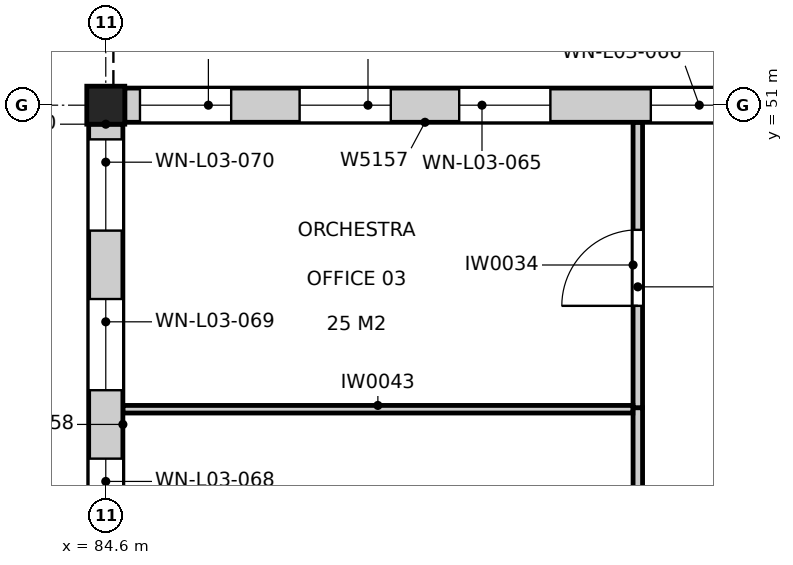
"""IFC4 building model, lengths in metres.
Left out: names, types, materials, properties, quantities, classifications, styles, units other than length and angle.
Written with IfcOpenShell. Run it as: python <this file> out.ifc"""

import sys

from ifc_helpers import new_model, si_unit, direction, frame, frame_2d, origin, origin_2d, place, context, subcontext, project, spatial, rectangle, extrude, element, fill, save


model = new_model("IFC4")
c1 = context("Model", 3, precision=1e-05, world=origin(), true_north=direction((0.0, 1.0)))
c2 = subcontext(c1, "Body", "Model", "MODEL_VIEW")
j1 = project(units=[si_unit("LENGTHUNIT", "METRE"), si_unit("PLANEANGLEUNIT", "RADIAN")], contexts=[c1])
p1 = place(None, origin())
s1 = spatial("IfcSite", under=j1, at=p1, CompositionType="ELEMENT")
p2 = place(p1, origin())
s2 = spatial("IfcBuilding", under=s1, at=p2, CompositionType="ELEMENT")
p3 = place(p2, frame((0.0, 0.0, 14.4)))
s3 = spatial("IfcBuildingStorey", under=s2, at=p3, CompositionType="ELEMENT", Elevation=14.4)
p4 = place(p3, frame((84.6, 51.0, 0.0), z_axis=(0.0, 0.0, 1.0), x_axis=(1.0, 0.0, 0.0)))
e1 = element("IfcColumn", 1, at=p4, inside=s3, PredefinedType="COLUMN", context=c2, shape_type="SweptSolid", body=[
    extrude(rectangle(XDim=0.5, YDim=0.5, at=origin_2d()), origin(), (0.0, 0.0, 1.0), 4.8),
])
p5 = place(p3, frame((91.601, 42.711, 0.0), z_axis=(0.0, 0.0, 1.0), x_axis=(-0.000226654573, 0.999999974314, 0.0)))
e2 = element("IfcWall", 2, at=p5, inside=s3, PredefinedType="PARTITIONING", context=c2, shape_type="SweptSolid", body=[
    extrude(rectangle(XDim=4.309, YDim=0.125, at=frame_2d((2.154, 0.0))), origin(), (0.0, 0.0, 1.0), 3.84),
])
p6 = place(p3, frame((91.6, 47.02, 0.0), z_axis=(0.0, 0.0, 1.0), x_axis=(0.0, 1.0, 0.0)))
e3 = element("IfcWall", 3, at=p6, inside=s3, PredefinedType="PARTITIONING", context=c2, shape_type="SweptSolid", body=[
    extrude(rectangle(XDim=3.755, YDim=0.125, at=frame_2d((1.877, 0.0))), origin(), (0.0, 0.0, 1.0), 3.94),
])
p7 = place(p6, frame((1.34, 0.0, 0.0)))
e4 = element("IfcOpeningElement", 4, at=p7, cuts=e3, PredefinedType="OPENING", context=c2, shape_type="SweptSolid", body=[
    extrude(rectangle(XDim=1.0, YDim=2.1, at=frame_2d((0.5, 1.05))), frame((0.0, 0.073, 0.0), z_axis=(0.0, -1.0, 0.0), x_axis=(1.0, 0.0, 0.0)), (0.0, 0.0, 1.0), 0.145),
])
p8 = place(p3, frame((84.825, 47.0, 0.0), z_axis=(0.0, 0.0, 1.0), x_axis=(1.0, 0.0, 0.0)))
e5 = element("IfcWall", 5, at=p8, inside=s3, PredefinedType="PARTITIONING", context=c2, shape_type="SweptSolid", body=[
    extrude(rectangle(XDim=6.71, YDim=0.1, at=frame_2d((3.355, 0.0))), origin(), (0.0, 0.0, 1.0), 4.64),
])
p9 = place(p3, frame((92.75, 51.0, 0.0), z_axis=(0.0, 0.0, 1.0), x_axis=(-1.0, 0.0, 0.0)))
e6 = element("IfcWall", 6, at=p9, inside=s3, PredefinedType="SOLIDWALL", context=c2, shape_type="SweptSolid", body=[
    extrude(rectangle(XDim=7.9, YDim=0.45, at=frame_2d((3.95, 0.0))), origin(), (0.0, 0.0, 1.0), 3.84),
])
p10 = place(p9, frame((6.5, 0.0, 0.9)))
e7 = element("IfcOpeningElement", 7, at=p10, cuts=e6, PredefinedType="OPENING", context=c2, shape_type="SweptSolid", body=[
    extrude(rectangle(XDim=1.2, YDim=2.4, at=frame_2d((0.6, 1.2))), frame((0.0, 0.235, 0.0), z_axis=(0.0, -1.0, 0.0), x_axis=(1.0, 0.0, 0.0)), (0.0, 0.0, 1.0), 0.47),
])
p11 = place(p9, frame((4.4, 0.0, 0.9)))
e8 = element("IfcOpeningElement", 8, at=p11, cuts=e6, PredefinedType="OPENING", context=c2, shape_type="SweptSolid", body=[
    extrude(rectangle(XDim=1.2, YDim=2.4, at=frame_2d((0.6, 1.2))), frame((0.0, 0.235, 0.0), z_axis=(0.0, -1.0, 0.0), x_axis=(1.0, 0.0, 0.0)), (0.0, 0.0, 1.0), 0.47),
])
p12 = place(p9, frame((2.3, 0.0, 0.9)))
e9 = element("IfcOpeningElement", 9, at=p12, cuts=e6, PredefinedType="OPENING", context=c2, shape_type="SweptSolid", body=[
    extrude(rectangle(XDim=1.2, YDim=2.4, at=frame_2d((0.6, 1.2))), frame((0.0, 0.235, 0.0), z_axis=(0.0, -1.0, 0.0), x_axis=(1.0, 0.0, 0.0)), (0.0, 0.0, 1.0), 0.47),
])
p13 = place(p9, frame((0.129, 0.0, 0.9)))
e10 = element("IfcOpeningElement", 10, at=p13, cuts=e6, PredefinedType="OPENING", context=c2, shape_type="SweptSolid", body=[
    extrude(rectangle(XDim=0.85, YDim=2.4, at=frame_2d((0.425, 1.2))), frame((0.0, 0.235, 0.0), z_axis=(0.0, -1.0, 0.0), x_axis=(1.0, 0.0, 0.0)), (0.0, 0.0, 1.0), 0.47),
])
p14 = place(p3, frame((84.6, 50.75, 0.0), z_axis=(0.0, 0.0, 1.0), x_axis=(0.0, -1.0, 0.0)))
e11 = element("IfcWall", 11, at=p14, inside=s3, PredefinedType="SOLIDWALL", context=c2, shape_type="SweptSolid", body=[
    extrude(rectangle(XDim=7.9, YDim=0.45, at=frame_2d((3.95, 0.0))), origin(), (0.0, 0.0, 1.0), 3.84),
])
p15 = place(p14, frame((6.5, 0.0, 0.9)))
e12 = element("IfcOpeningElement", 12, at=p15, cuts=e11, PredefinedType="OPENING", context=c2, shape_type="SweptSolid", body=[
    extrude(rectangle(XDim=1.2, YDim=2.4, at=frame_2d((0.6, 1.2))), frame((0.0, 0.235, 0.0), z_axis=(0.0, -1.0, 0.0), x_axis=(1.0, 0.0, 0.0)), (0.0, 0.0, 1.0), 0.47),
])
p16 = place(p14, frame((4.4, 0.0, 0.9)))
e13 = element("IfcOpeningElement", 13, at=p16, cuts=e11, PredefinedType="OPENING", context=c2, shape_type="SweptSolid", body=[
    extrude(rectangle(XDim=1.2, YDim=2.4, at=frame_2d((0.6, 1.2))), frame((0.0, 0.235, 0.0), z_axis=(0.0, -1.0, 0.0), x_axis=(1.0, 0.0, 0.0)), (0.0, 0.0, 1.0), 0.47),
])
p17 = place(p14, frame((2.3, 0.0, 0.9)))
e14 = element("IfcOpeningElement", 14, at=p17, cuts=e11, PredefinedType="OPENING", context=c2, shape_type="SweptSolid", body=[
    extrude(rectangle(XDim=1.2, YDim=2.4, at=frame_2d((0.6, 1.2))), frame((0.0, 0.235, 0.0), z_axis=(0.0, -1.0, 0.0), x_axis=(1.0, 0.0, 0.0)), (0.0, 0.0, 1.0), 0.47),
])
p18 = place(p14, frame((0.2, 0.0, 0.9)))
e15 = element("IfcOpeningElement", 15, at=p18, cuts=e11, PredefinedType="OPENING", context=c2, shape_type="SweptSolid", body=[
    extrude(rectangle(XDim=1.2, YDim=2.4, at=frame_2d((0.6, 1.2))), frame((0.0, 0.235, 0.0), z_axis=(0.0, -1.0, 0.0), x_axis=(1.0, 0.0, 0.0)), (0.0, 0.0, 1.0), 0.47),
])
p19 = place(p7, origin())
e16 = element("IfcDoor", 16, at=p19, inside=s3, OperationType="SINGLE_SWING_LEFT", PredefinedType="DOOR", context=c2, shape_type="SweptSolid", body=[
    extrude(rectangle(XDim=1.0, YDim=2.1, at=frame_2d((0.5, 1.05))), frame((0.0, 0.025, 0.0), z_axis=(0.0, -1.0, 0.0), x_axis=(1.0, 0.0, 0.0)), (0.0, 0.0, 1.0), 0.05),
])
fill(e4, e16)
p20 = place(p10, origin())
e17 = element("IfcWindow", 17, at=p20, inside=s3, PartitioningType="SINGLE_PANEL", PredefinedType="WINDOW", context=c2, shape_type="SweptSolid", body=[
    extrude(rectangle(XDim=1.2, YDim=2.4, at=frame_2d((0.6, 1.2))), frame((0.0, 0.135, 0.0), z_axis=(0.0, -1.0, 0.0), x_axis=(1.0, 0.0, 0.0)), (0.0, 0.0, 1.0), 0.06),
])
fill(e7, e17)
p21 = place(p11, origin())
e18 = element("IfcWindow", 18, at=p21, inside=s3, PartitioningType="SINGLE_PANEL", PredefinedType="WINDOW", context=c2, shape_type="SweptSolid", body=[
    extrude(rectangle(XDim=1.2, YDim=2.4, at=frame_2d((0.6, 1.2))), frame((0.0, 0.135, 0.0), z_axis=(0.0, -1.0, 0.0), x_axis=(1.0, 0.0, 0.0)), (0.0, 0.0, 1.0), 0.06),
])
fill(e8, e18)
p22 = place(p12, origin())
e19 = element("IfcWindow", 19, at=p22, inside=s3, PartitioningType="SINGLE_PANEL", PredefinedType="WINDOW", context=c2, shape_type="SweptSolid", body=[
    extrude(rectangle(XDim=1.2, YDim=2.4, at=frame_2d((0.6, 1.2))), frame((0.0, 0.135, 0.0), z_axis=(0.0, -1.0, 0.0), x_axis=(1.0, 0.0, 0.0)), (0.0, 0.0, 1.0), 0.06),
])
fill(e9, e19)
p23 = place(p13, origin())
e20 = element("IfcWindow", 20, at=p23, inside=s3, PartitioningType="SINGLE_PANEL", PredefinedType="WINDOW", context=c2, shape_type="SweptSolid", body=[
    extrude(rectangle(XDim=0.85, YDim=2.4, at=frame_2d((0.425, 1.2))), frame((0.0, 0.135, 0.0), z_axis=(0.0, -1.0, 0.0), x_axis=(1.0, 0.0, 0.0)), (0.0, 0.0, 1.0), 0.06),
])
fill(e10, e20)
p24 = place(p16, origin())
e21 = element("IfcWindow", 21, at=p24, inside=s3, PartitioningType="SINGLE_PANEL", PredefinedType="WINDOW", context=c2, shape_type="SweptSolid", body=[
    extrude(rectangle(XDim=1.2, YDim=2.4, at=frame_2d((0.6, 1.2))), frame((0.0, 0.135, 0.0), z_axis=(0.0, -1.0, 0.0), x_axis=(1.0, 0.0, 0.0)), (0.0, 0.0, 1.0), 0.06),
])
fill(e13, e21)
p25 = place(p17, origin())
e22 = element("IfcWindow", 22, at=p25, inside=s3, PartitioningType="SINGLE_PANEL", PredefinedType="WINDOW", context=c2, shape_type="SweptSolid", body=[
    extrude(rectangle(XDim=1.2, YDim=2.4, at=frame_2d((0.6, 1.2))), frame((0.0, 0.135, 0.0), z_axis=(0.0, -1.0, 0.0), x_axis=(1.0, 0.0, 0.0)), (0.0, 0.0, 1.0), 0.06),
])
fill(e14, e22)
p26 = place(p18, origin())
e23 = element("IfcWindow", 23, at=p26, inside=s3, PartitioningType="SINGLE_PANEL", PredefinedType="WINDOW", context=c2, shape_type="SweptSolid", body=[
    extrude(rectangle(XDim=1.2, YDim=2.4, at=frame_2d((0.6, 1.2))), frame((0.0, 0.135, 0.0), z_axis=(0.0, -1.0, 0.0), x_axis=(1.0, 0.0, 0.0)), (0.0, 0.0, 1.0), 0.06),
])
fill(e15, e23)
save(model, sys.argv[1])
